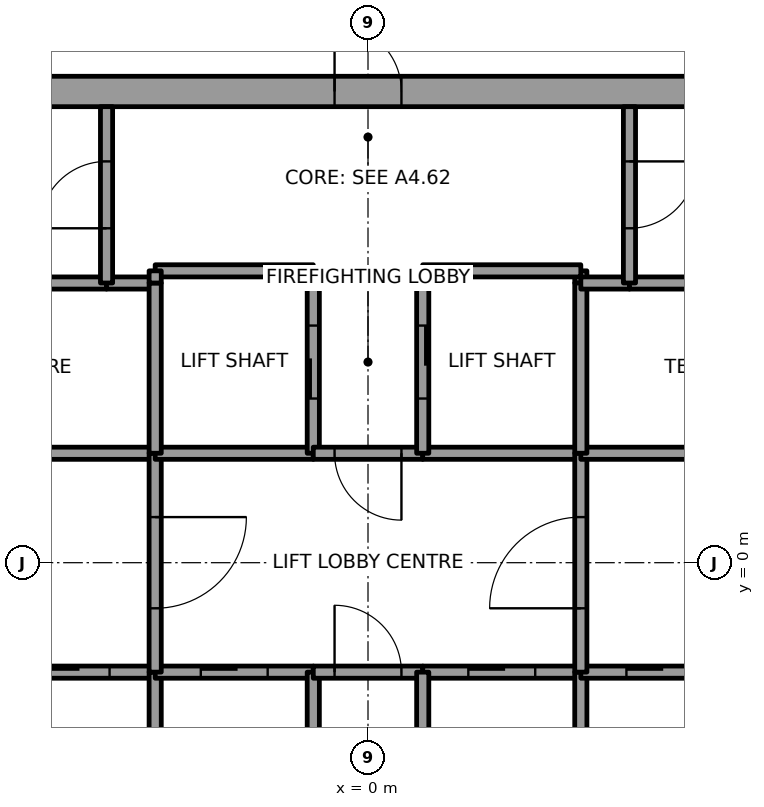
"""IFC4 building model, lengths in metres.
Left out: names, types, materials, properties, quantities, classifications, styles, units other than length and angle.
Written with IfcOpenShell. Run it as: python <this file> out.ifc"""

import sys

from ifc_helpers import new_model, si_unit, direction, frame, frame_2d, origin, place, context, subcontext, project, spatial, rectangle, extrude, element, fill, save


model = new_model("IFC4")
c1 = context("Model", 3, precision=1e-05, world=origin(), true_north=direction((0.0, 1.0)))
c2 = subcontext(c1, "Body", "Model", "MODEL_VIEW")
j1 = project(units=[si_unit("LENGTHUNIT", "METRE"), si_unit("PLANEANGLEUNIT", "RADIAN")], contexts=[c1])
p1 = place(None, origin())
s1 = spatial("IfcSite", under=j1, at=p1, CompositionType="ELEMENT")
p2 = place(p1, origin())
s2 = spatial("IfcBuilding", under=s1, at=p2, CompositionType="ELEMENT")
p3 = place(p2, frame((0.0, 0.0, 267.0)))
s3 = spatial("IfcBuildingStorey", under=s2, at=p3, CompositionType="ELEMENT", Elevation=267.0)
p4 = place(p3, frame((-11.0, 7.75, 0.0), z_axis=(0.0, 0.0, 1.0), x_axis=(1.0, 0.0, 0.0)))
e1 = element("IfcWall", 1, at=p4, inside=s3, PredefinedType="SHEAR", context=c2, shape_type="SweptSolid", body=[
    extrude(rectangle(XDim=22.0, YDim=0.5, at=frame_2d((11.0, 0.0))), origin(), (0.0, 0.0, 1.0), 4.0),
])
p5 = place(p4, frame((10.45, 0.0, 0.0)))
e2 = element("IfcOpeningElement", 2, at=p5, cuts=e1, PredefinedType="OPENING", context=c2, shape_type="SweptSolid", body=[
    extrude(rectangle(XDim=1.1, YDim=2.1, at=frame_2d((0.55, 1.05))), frame((0.0, 0.25, 0.0), z_axis=(0.0, -1.0, 0.0), x_axis=(1.0, 0.0, 0.0)), (0.0, 0.0, 1.0), 0.5),
])
p6 = place(p3, frame((-8.7, 1.8, 0.0), z_axis=(0.0, 0.0, 1.0), x_axis=(1.0, 0.0, 0.0)))
e3 = element("IfcWall", 3, at=p6, inside=s3, PredefinedType="SOLIDWALL", context=c2, shape_type="SweptSolid", body=[
    extrude(rectangle(XDim=5.2, YDim=0.2, at=frame_2d((2.6, 0.0))), origin(), (0.0, 0.0, 1.0), 3.85),
])
p7 = place(p6, frame((2.15, 0.0, 0.0)))
e4 = element("IfcOpeningElement", 4, at=p7, cuts=e3, PredefinedType="OPENING", context=c2, shape_type="SweptSolid", body=[
    extrude(rectangle(XDim=0.9, YDim=2.1, at=frame_2d((0.45, 1.05))), frame((0.0, 0.1, 0.0), z_axis=(0.0, -1.0, 0.0), x_axis=(1.0, 0.0, 0.0)), (0.0, 0.0, 1.0), 0.2),
])
p8 = place(p3, frame((-4.3, 4.6, 0.0), z_axis=(0.0, 0.0, 1.0), x_axis=(-1.0, 0.0, 0.0)))
e5 = element("IfcWall", 5, at=p8, inside=s3, PredefinedType="SOLIDWALL", context=c2, shape_type="SweptSolid", body=[
    extrude(rectangle(XDim=4.4, YDim=0.2, at=frame_2d((2.2, 0.0))), origin(), (0.0, 0.0, 1.0), 3.85),
])
p9 = place(p3, frame((-6.1, -1.8, 0.0), z_axis=(0.0, 0.0, 1.0), x_axis=(1.0, 0.0, 0.0)))
e6 = element("IfcWall", 6, at=p9, inside=s3, PredefinedType="SOLIDWALL", context=c2, shape_type="SweptSolid", body=[
    extrude(rectangle(XDim=2.6, YDim=0.2, at=frame_2d((1.3, 0.0))), origin(), (0.0, 0.0, 1.0), 3.85),
])
p10 = place(p9, frame((0.75, 0.0, 0.0)))
e7 = element("IfcOpeningElement", 7, at=p10, cuts=e6, PredefinedType="OPENING", context=c2, shape_type="SweptSolid", body=[
    extrude(rectangle(XDim=1.1, YDim=2.1, at=frame_2d((0.55, 1.05))), frame((0.0, 0.1, 0.0), z_axis=(0.0, -1.0, 0.0), x_axis=(1.0, 0.0, 0.0)), (0.0, 0.0, 1.0), 0.2),
])
p11 = place(p3, frame((-3.5, 4.6, 0.0), z_axis=(0.0, 0.0, 1.0), x_axis=(-1.0, 0.0, 0.0)))
e8 = element("IfcWall", 8, at=p11, inside=s3, PredefinedType="SOLIDWALL", context=c2, shape_type="SweptSolid", body=[
    extrude(rectangle(XDim=0.8, YDim=0.2, at=frame_2d((0.4, 0.0))), origin(), (0.0, 0.0, 1.0), 3.85),
])
p12 = place(p3, frame((-4.3, 4.6, 0.0), z_axis=(0.0, 0.0, 1.0), x_axis=(0.0, 1.0, 0.0)))
e9 = element("IfcWall", 9, at=p12, inside=s3, PredefinedType="SOLIDWALL", context=c2, shape_type="SweptSolid", body=[
    extrude(rectangle(XDim=2.9, YDim=0.2, at=frame_2d((1.45, 0.0))), origin(), (0.0, 0.0, 1.0), 3.85),
])
p13 = place(p12, frame((0.9, 0.0, 0.0)))
e10 = element("IfcOpeningElement", 10, at=p13, cuts=e9, PredefinedType="OPENING", context=c2, shape_type="SweptSolid", body=[
    extrude(rectangle(XDim=1.1, YDim=2.1, at=frame_2d((0.55, 1.05))), frame((0.0, 0.1, 0.0), z_axis=(0.0, -1.0, 0.0), x_axis=(1.0, 0.0, 0.0)), (0.0, 0.0, 1.0), 0.2),
])
p14 = place(p3, frame((-3.5, -4.6, 0.0), z_axis=(0.0, 0.0, 1.0), x_axis=(0.0, 1.0, 0.0)))
e11 = element("IfcWall", 11, at=p14, inside=s3, PredefinedType="SOLIDWALL", context=c2, shape_type="SweptSolid", body=[
    extrude(rectangle(XDim=2.8, YDim=0.2, at=frame_2d((1.4, 0.0))), origin(), (0.0, 0.0, 1.0), 3.85),
])
p15 = place(p3, frame((-3.5, -1.8, 0.0), z_axis=(0.0, 0.0, 1.0), x_axis=(1.0, 0.0, 0.0)))
e12 = element("IfcWall", 12, at=p15, inside=s3, PredefinedType="SOLIDWALL", context=c2, shape_type="SweptSolid", body=[
    extrude(rectangle(XDim=2.6, YDim=0.2, at=frame_2d((1.3, 0.0))), origin(), (0.0, 0.0, 1.0), 3.85),
])
p16 = place(p15, frame((0.75, 0.0, 0.0)))
e13 = element("IfcOpeningElement", 13, at=p16, cuts=e12, PredefinedType="OPENING", context=c2, shape_type="SweptSolid", body=[
    extrude(rectangle(XDim=1.1, YDim=2.1, at=frame_2d((0.55, 1.05))), frame((0.0, 0.1, 0.0), z_axis=(0.0, -1.0, 0.0), x_axis=(1.0, 0.0, 0.0)), (0.0, 0.0, 1.0), 0.2),
])
p17 = place(p3, frame((-3.5, 1.8, 0.0), z_axis=(0.0, 0.0, 1.0), x_axis=(0.0, -1.0, 0.0)))
e14 = element("IfcWall", 14, at=p17, inside=s3, PredefinedType="SOLIDWALL", context=c2, shape_type="SweptSolid", body=[
    extrude(rectangle(XDim=3.6, YDim=0.2, at=frame_2d((1.8, 0.0))), origin(), (0.0, 0.0, 1.0), 3.85),
])
p18 = place(p17, frame((1.05, 0.0, 0.0)))
e15 = element("IfcOpeningElement", 15, at=p18, cuts=e14, PredefinedType="OPENING", context=c2, shape_type="SweptSolid", body=[
    extrude(rectangle(XDim=1.5, YDim=2.1, at=frame_2d((0.75, 1.05))), frame((0.0, 0.1, 0.0), z_axis=(0.0, -1.0, 0.0), x_axis=(1.0, 0.0, 0.0)), (0.0, 0.0, 1.0), 0.2),
])
p19 = place(p3, frame((-0.9, 1.8, 0.0), z_axis=(0.0, 0.0, 1.0), x_axis=(-1.0, 0.0, 0.0)))
e16 = element("IfcWall", 16, at=p19, inside=s3, PredefinedType="SOLIDWALL", context=c2, shape_type="SweptSolid", body=[
    extrude(rectangle(XDim=2.6, YDim=0.2, at=frame_2d((1.3, 0.0))), origin(), (0.0, 0.0, 1.0), 3.85),
])
p20 = place(p3, frame((-3.5, 1.8, 0.0), z_axis=(0.0, 0.0, 1.0), x_axis=(0.0, 1.0, 0.0)))
e17 = element("IfcWall", 17, at=p20, inside=s3, PredefinedType="SOLIDWALL", context=c2, shape_type="SweptSolid", body=[
    extrude(rectangle(XDim=2.8, YDim=0.2, at=frame_2d((1.4, 0.0))), origin(), (0.0, 0.0, 1.0), 3.85),
])
p21 = place(p3, frame((-0.9, 1.8, 0.0), z_axis=(0.0, 0.0, 1.0), x_axis=(0.0, 1.0, 0.0)))
e18 = element("IfcWall", 18, at=p21, inside=s3, PredefinedType="SOLIDWALL", context=c2, shape_type="SweptSolid", body=[
    extrude(rectangle(XDim=3.0, YDim=0.2, at=frame_2d((1.5, 0.0))), origin(), (0.0, 0.0, 1.0), 3.85),
])
p22 = place(p21, frame((0.9, 0.0, 0.0)))
e19 = element("IfcOpeningElement", 19, at=p22, cuts=e18, PredefinedType="OPENING", context=c2, shape_type="SweptSolid", body=[
    extrude(rectangle(XDim=1.2, YDim=2.1, at=frame_2d((0.6, 1.05))), frame((0.0, 0.1, 0.0), z_axis=(0.0, -1.0, 0.0), x_axis=(1.0, 0.0, 0.0)), (0.0, 0.0, 1.0), 0.2),
])
p23 = place(p3, frame((-0.9, 4.8, 0.0), z_axis=(0.0, 0.0, 1.0), x_axis=(-1.0, 0.0, 0.0)))
e20 = element("IfcWall", 20, at=p23, inside=s3, PredefinedType="SOLIDWALL", context=c2, shape_type="SweptSolid", body=[
    extrude(rectangle(XDim=2.6, YDim=0.2, at=frame_2d((1.3, 0.0))), origin(), (0.0, 0.0, 1.0), 3.85),
])
p24 = place(p3, frame((-3.5, 4.8, 0.0), z_axis=(0.0, 0.0, 1.0), x_axis=(0.0, -1.0, 0.0)))
e21 = element("IfcWall", 21, at=p24, inside=s3, PredefinedType="SOLIDWALL", context=c2, shape_type="SweptSolid", body=[
    extrude(rectangle(XDim=0.2, YDim=0.2, at=frame_2d((0.1, 0.0))), origin(), (0.0, 0.0, 1.0), 3.85),
])
p25 = place(p3, frame((-0.9, -4.6, 0.0), z_axis=(0.0, 0.0, 1.0), x_axis=(0.0, 1.0, 0.0)))
e22 = element("IfcWall", 22, at=p25, inside=s3, PredefinedType="SOLIDWALL", context=c2, shape_type="SweptSolid", body=[
    extrude(rectangle(XDim=2.8, YDim=0.2, at=frame_2d((1.4, 0.0))), origin(), (0.0, 0.0, 1.0), 3.85),
])
p26 = place(p3, frame((-0.9, -1.8, 0.0), z_axis=(0.0, 0.0, 1.0), x_axis=(1.0, 0.0, 0.0)))
e23 = element("IfcWall", 23, at=p26, inside=s3, PredefinedType="SOLIDWALL", context=c2, shape_type="SweptSolid", body=[
    extrude(rectangle(XDim=1.8, YDim=0.2, at=frame_2d((0.9, 0.0))), origin(), (0.0, 0.0, 1.0), 3.85),
])
p27 = place(p26, frame((0.35, 0.0, 0.0)))
e24 = element("IfcOpeningElement", 24, at=p27, cuts=e23, PredefinedType="OPENING", context=c2, shape_type="SweptSolid", body=[
    extrude(rectangle(XDim=1.1, YDim=2.1, at=frame_2d((0.55, 1.05))), frame((0.0, 0.1, 0.0), z_axis=(0.0, -1.0, 0.0), x_axis=(1.0, 0.0, 0.0)), (0.0, 0.0, 1.0), 0.2),
])
p28 = place(p3, frame((0.9, 1.8, 0.0), z_axis=(0.0, 0.0, 1.0), x_axis=(-1.0, 0.0, 0.0)))
e25 = element("IfcWall", 25, at=p28, inside=s3, PredefinedType="SOLIDWALL", context=c2, shape_type="SweptSolid", body=[
    extrude(rectangle(XDim=1.8, YDim=0.2, at=frame_2d((0.9, 0.0))), origin(), (0.0, 0.0, 1.0), 3.85),
])
p29 = place(p28, frame((0.35, 0.0, 0.0)))
e26 = element("IfcOpeningElement", 26, at=p29, cuts=e25, PredefinedType="OPENING", context=c2, shape_type="SweptSolid", body=[
    extrude(rectangle(XDim=1.1, YDim=2.1, at=frame_2d((0.55, 1.05))), frame((0.0, 0.1, 0.0), z_axis=(0.0, -1.0, 0.0), x_axis=(1.0, 0.0, 0.0)), (0.0, 0.0, 1.0), 0.2),
])
p30 = place(p3, frame((0.9, -1.8, 0.0), z_axis=(0.0, 0.0, 1.0), x_axis=(1.0, 0.0, 0.0)))
e27 = element("IfcWall", 27, at=p30, inside=s3, PredefinedType="SOLIDWALL", context=c2, shape_type="SweptSolid", body=[
    extrude(rectangle(XDim=2.6, YDim=0.2, at=frame_2d((1.3, 0.0))), origin(), (0.0, 0.0, 1.0), 3.85),
])
p31 = place(p30, frame((0.75, 0.0, 0.0)))
e28 = element("IfcOpeningElement", 28, at=p31, cuts=e27, PredefinedType="OPENING", context=c2, shape_type="SweptSolid", body=[
    extrude(rectangle(XDim=1.1, YDim=2.1, at=frame_2d((0.55, 1.05))), frame((0.0, 0.1, 0.0), z_axis=(0.0, -1.0, 0.0), x_axis=(1.0, 0.0, 0.0)), (0.0, 0.0, 1.0), 0.2),
])
p32 = place(p3, frame((0.9, -1.8, 0.0), z_axis=(0.0, 0.0, 1.0), x_axis=(0.0, -1.0, 0.0)))
e29 = element("IfcWall", 29, at=p32, inside=s3, PredefinedType="SOLIDWALL", context=c2, shape_type="SweptSolid", body=[
    extrude(rectangle(XDim=2.8, YDim=0.2, at=frame_2d((1.4, 0.0))), origin(), (0.0, 0.0, 1.0), 3.85),
])
p33 = place(p3, frame((3.5, 1.8, 0.0), z_axis=(0.0, 0.0, 1.0), x_axis=(-1.0, 0.0, 0.0)))
e30 = element("IfcWall", 30, at=p33, inside=s3, PredefinedType="SOLIDWALL", context=c2, shape_type="SweptSolid", body=[
    extrude(rectangle(XDim=2.6, YDim=0.2, at=frame_2d((1.3, 0.0))), origin(), (0.0, 0.0, 1.0), 3.85),
])
p34 = place(p3, frame((3.5, 4.6, 0.0), z_axis=(0.0, 0.0, 1.0), x_axis=(0.0, 1.0, 0.0)))
e31 = element("IfcWall", 31, at=p34, inside=s3, PredefinedType="SOLIDWALL", context=c2, shape_type="SweptSolid", body=[
    extrude(rectangle(XDim=0.2, YDim=0.2, at=frame_2d((0.1, 0.0))), origin(), (0.0, 0.0, 1.0), 3.85),
])
p35 = place(p3, frame((3.5, 4.8, 0.0), z_axis=(0.0, 0.0, 1.0), x_axis=(-1.0, 0.0, 0.0)))
e32 = element("IfcWall", 32, at=p35, inside=s3, PredefinedType="SOLIDWALL", context=c2, shape_type="SweptSolid", body=[
    extrude(rectangle(XDim=2.6, YDim=0.2, at=frame_2d((1.3, 0.0))), origin(), (0.0, 0.0, 1.0), 3.85),
])
p36 = place(p3, frame((0.9, 4.8, 0.0), z_axis=(0.0, 0.0, 1.0), x_axis=(0.0, -1.0, 0.0)))
e33 = element("IfcWall", 33, at=p36, inside=s3, PredefinedType="SOLIDWALL", context=c2, shape_type="SweptSolid", body=[
    extrude(rectangle(XDim=3.0, YDim=0.2, at=frame_2d((1.5, 0.0))), origin(), (0.0, 0.0, 1.0), 3.85),
])
p37 = place(p36, frame((0.9, 0.0, 0.0)))
e34 = element("IfcOpeningElement", 34, at=p37, cuts=e33, PredefinedType="OPENING", context=c2, shape_type="SweptSolid", body=[
    extrude(rectangle(XDim=1.2, YDim=2.1, at=frame_2d((0.6, 1.05))), frame((0.0, 0.1, 0.0), z_axis=(0.0, -1.0, 0.0), x_axis=(1.0, 0.0, 0.0)), (0.0, 0.0, 1.0), 0.2),
])
p38 = place(p3, frame((3.5, -4.6, 0.0), z_axis=(0.0, 0.0, 1.0), x_axis=(0.0, 1.0, 0.0)))
e35 = element("IfcWall", 35, at=p38, inside=s3, PredefinedType="SOLIDWALL", context=c2, shape_type="SweptSolid", body=[
    extrude(rectangle(XDim=2.8, YDim=0.2, at=frame_2d((1.4, 0.0))), origin(), (0.0, 0.0, 1.0), 3.85),
])
p39 = place(p3, frame((3.5, -1.8, 0.0), z_axis=(0.0, 0.0, 1.0), x_axis=(1.0, 0.0, 0.0)))
e36 = element("IfcWall", 36, at=p39, inside=s3, PredefinedType="SOLIDWALL", context=c2, shape_type="SweptSolid", body=[
    extrude(rectangle(XDim=2.6, YDim=0.2, at=frame_2d((1.3, 0.0))), origin(), (0.0, 0.0, 1.0), 3.85),
])
p40 = place(p39, frame((0.75, 0.0, 0.0)))
e37 = element("IfcOpeningElement", 37, at=p40, cuts=e36, PredefinedType="OPENING", context=c2, shape_type="SweptSolid", body=[
    extrude(rectangle(XDim=1.1, YDim=2.1, at=frame_2d((0.55, 1.05))), frame((0.0, 0.1, 0.0), z_axis=(0.0, -1.0, 0.0), x_axis=(1.0, 0.0, 0.0)), (0.0, 0.0, 1.0), 0.2),
])
p41 = place(p3, frame((3.5, -1.8, 0.0), z_axis=(0.0, 0.0, 1.0), x_axis=(0.0, 1.0, 0.0)))
e38 = element("IfcWall", 38, at=p41, inside=s3, PredefinedType="SOLIDWALL", context=c2, shape_type="SweptSolid", body=[
    extrude(rectangle(XDim=3.6, YDim=0.2, at=frame_2d((1.8, 0.0))), origin(), (0.0, 0.0, 1.0), 3.85),
])
p42 = place(p41, frame((1.05, 0.0, 0.0)))
e39 = element("IfcOpeningElement", 39, at=p42, cuts=e38, PredefinedType="OPENING", context=c2, shape_type="SweptSolid", body=[
    extrude(rectangle(XDim=1.5, YDim=2.1, at=frame_2d((0.75, 1.05))), frame((0.0, 0.1, 0.0), z_axis=(0.0, -1.0, 0.0), x_axis=(1.0, 0.0, 0.0)), (0.0, 0.0, 1.0), 0.2),
])
p43 = place(p3, frame((3.5, 1.8, 0.0), z_axis=(0.0, 0.0, 1.0), x_axis=(1.0, 0.0, 0.0)))
e40 = element("IfcWall", 40, at=p43, inside=s3, PredefinedType="SOLIDWALL", context=c2, shape_type="SweptSolid", body=[
    extrude(rectangle(XDim=5.2, YDim=0.2, at=frame_2d((2.6, 0.0))), origin(), (0.0, 0.0, 1.0), 3.85),
])
p44 = place(p43, frame((2.15, 0.0, 0.0)))
e41 = element("IfcOpeningElement", 41, at=p44, cuts=e40, PredefinedType="OPENING", context=c2, shape_type="SweptSolid", body=[
    extrude(rectangle(XDim=0.9, YDim=2.1, at=frame_2d((0.45, 1.05))), frame((0.0, 0.1, 0.0), z_axis=(0.0, -1.0, 0.0), x_axis=(1.0, 0.0, 0.0)), (0.0, 0.0, 1.0), 0.2),
])
p45 = place(p3, frame((3.5, 4.6, 0.0), z_axis=(0.0, 0.0, 1.0), x_axis=(0.0, -1.0, 0.0)))
e42 = element("IfcWall", 42, at=p45, inside=s3, PredefinedType="SOLIDWALL", context=c2, shape_type="SweptSolid", body=[
    extrude(rectangle(XDim=2.8, YDim=0.2, at=frame_2d((1.4, 0.0))), origin(), (0.0, 0.0, 1.0), 3.85),
])
p46 = place(p3, frame((4.3, 4.6, 0.0), z_axis=(0.0, 0.0, 1.0), x_axis=(-1.0, 0.0, 0.0)))
e43 = element("IfcWall", 43, at=p46, inside=s3, PredefinedType="SOLIDWALL", context=c2, shape_type="SweptSolid", body=[
    extrude(rectangle(XDim=0.8, YDim=0.2, at=frame_2d((0.4, 0.0))), origin(), (0.0, 0.0, 1.0), 3.85),
])
p47 = place(p3, frame((8.7, 4.6, 0.0), z_axis=(0.0, 0.0, 1.0), x_axis=(-1.0, 0.0, 0.0)))
e44 = element("IfcWall", 44, at=p47, inside=s3, PredefinedType="SOLIDWALL", context=c2, shape_type="SweptSolid", body=[
    extrude(rectangle(XDim=4.4, YDim=0.2, at=frame_2d((2.2, 0.0))), origin(), (0.0, 0.0, 1.0), 3.85),
])
p48 = place(p3, frame((4.3, 7.5, 0.0), z_axis=(0.0, 0.0, 1.0), x_axis=(0.0, -1.0, 0.0)))
e45 = element("IfcWall", 45, at=p48, inside=s3, PredefinedType="SOLIDWALL", context=c2, shape_type="SweptSolid", body=[
    extrude(rectangle(XDim=2.9, YDim=0.2, at=frame_2d((1.45, 0.0))), origin(), (0.0, 0.0, 1.0), 3.85),
])
p49 = place(p48, frame((0.9, 0.0, 0.0)))
e46 = element("IfcOpeningElement", 46, at=p49, cuts=e45, PredefinedType="OPENING", context=c2, shape_type="SweptSolid", body=[
    extrude(rectangle(XDim=1.1, YDim=2.1, at=frame_2d((0.55, 1.05))), frame((0.0, 0.1, 0.0), z_axis=(0.0, -1.0, 0.0), x_axis=(1.0, 0.0, 0.0)), (0.0, 0.0, 1.0), 0.2),
])
p50 = place(p10, origin())
e47 = element("IfcDoor", 47, at=p50, inside=s3, OperationType="SLIDING_TO_LEFT", PredefinedType="DOOR", context=c2, shape_type="SweptSolid", body=[
    extrude(rectangle(XDim=1.1, YDim=2.1, at=frame_2d((0.55, 1.05))), frame((0.0, 0.025, 0.0), z_axis=(0.0, -1.0, 0.0), x_axis=(1.0, 0.0, 0.0)), (0.0, 0.0, 1.0), 0.05),
])
fill(e7, e47)
p51 = place(p16, origin())
e48 = element("IfcDoor", 48, at=p51, inside=s3, OperationType="SLIDING_TO_LEFT", PredefinedType="DOOR", context=c2, shape_type="SweptSolid", body=[
    extrude(rectangle(XDim=1.1, YDim=2.1, at=frame_2d((0.55, 1.05))), frame((0.0, 0.025, 0.0), z_axis=(0.0, -1.0, 0.0), x_axis=(1.0, 0.0, 0.0)), (0.0, 0.0, 1.0), 0.05),
])
fill(e13, e48)
p52 = place(p31, origin())
e49 = element("IfcDoor", 49, at=p52, inside=s3, OperationType="SLIDING_TO_RIGHT", PredefinedType="DOOR", context=c2, shape_type="SweptSolid", body=[
    extrude(rectangle(XDim=1.1, YDim=2.1, at=frame_2d((0.55, 1.05))), frame((0.0, 0.025, 0.0), z_axis=(0.0, -1.0, 0.0), x_axis=(1.0, 0.0, 0.0)), (0.0, 0.0, 1.0), 0.05),
])
fill(e28, e49)
p53 = place(p40, origin())
e50 = element("IfcDoor", 50, at=p53, inside=s3, OperationType="SLIDING_TO_LEFT", PredefinedType="DOOR", context=c2, shape_type="SweptSolid", body=[
    extrude(rectangle(XDim=1.1, YDim=2.1, at=frame_2d((0.55, 1.05))), frame((0.0, 0.025, 0.0), z_axis=(0.0, -1.0, 0.0), x_axis=(1.0, 0.0, 0.0)), (0.0, 0.0, 1.0), 0.05),
])
fill(e37, e50)
p54 = place(p22, origin())
e51 = element("IfcDoor", 51, at=p54, inside=s3, OperationType="SLIDING_TO_RIGHT", PredefinedType="DOOR", context=c2, shape_type="SweptSolid", body=[
    extrude(rectangle(XDim=1.2, YDim=2.1, at=frame_2d((0.6, 1.05))), frame((0.0, 0.025, 0.0), z_axis=(0.0, -1.0, 0.0), x_axis=(1.0, 0.0, 0.0)), (0.0, 0.0, 1.0), 0.05),
])
fill(e19, e51)
p55 = place(p37, origin())
e52 = element("IfcDoor", 52, at=p55, inside=s3, OperationType="SLIDING_TO_LEFT", PredefinedType="DOOR", context=c2, shape_type="SweptSolid", body=[
    extrude(rectangle(XDim=1.2, YDim=2.1, at=frame_2d((0.6, 1.05))), frame((0.0, 0.025, 0.0), z_axis=(0.0, -1.0, 0.0), x_axis=(1.0, 0.0, 0.0)), (0.0, 0.0, 1.0), 0.05),
])
fill(e34, e52)
p56 = place(p18, origin())
e53 = element("IfcDoor", 53, at=p56, inside=s3, OperationType="DOUBLE_DOOR_SINGLE_SWING", PredefinedType="DOOR", context=c2, shape_type="SweptSolid", body=[
    extrude(rectangle(XDim=1.5, YDim=2.1, at=frame_2d((0.75, 1.05))), frame((0.0, 0.025, 0.0), z_axis=(0.0, -1.0, 0.0), x_axis=(1.0, 0.0, 0.0)), (0.0, 0.0, 1.0), 0.05),
])
fill(e15, e53)
p57 = place(p42, origin())
e54 = element("IfcDoor", 54, at=p57, inside=s3, OperationType="DOUBLE_DOOR_SINGLE_SWING", PredefinedType="DOOR", context=c2, shape_type="SweptSolid", body=[
    extrude(rectangle(XDim=1.5, YDim=2.1, at=frame_2d((0.75, 1.05))), frame((0.0, 0.025, 0.0), z_axis=(0.0, -1.0, 0.0), x_axis=(1.0, 0.0, 0.0)), (0.0, 0.0, 1.0), 0.05),
])
fill(e39, e54)
p58 = place(p29, origin())
e55 = element("IfcDoor", 55, at=p58, inside=s3, OperationType="SINGLE_SWING_LEFT", PredefinedType="DOOR", context=c2, shape_type="SweptSolid", body=[
    extrude(rectangle(XDim=1.1, YDim=2.1, at=frame_2d((0.55, 1.05))), frame((0.0, 0.025, 0.0), z_axis=(0.0, -1.0, 0.0), x_axis=(1.0, 0.0, 0.0)), (0.0, 0.0, 1.0), 0.05),
])
fill(e26, e55)
p59 = place(p27, origin())
e56 = element("IfcDoor", 56, at=p59, inside=s3, OperationType="SINGLE_SWING_LEFT", PredefinedType="DOOR", context=c2, shape_type="SweptSolid", body=[
    extrude(rectangle(XDim=1.1, YDim=2.1, at=frame_2d((0.55, 1.05))), frame((0.0, 0.025, 0.0), z_axis=(0.0, -1.0, 0.0), x_axis=(1.0, 0.0, 0.0)), (0.0, 0.0, 1.0), 0.05),
])
fill(e24, e56)
p60 = place(p13, origin())
e57 = element("IfcDoor", 57, at=p60, inside=s3, OperationType="SINGLE_SWING_RIGHT", PredefinedType="DOOR", context=c2, shape_type="SweptSolid", body=[
    extrude(rectangle(XDim=1.1, YDim=2.1, at=frame_2d((0.55, 1.05))), frame((0.0, 0.025, 0.0), z_axis=(0.0, -1.0, 0.0), x_axis=(1.0, 0.0, 0.0)), (0.0, 0.0, 1.0), 0.05),
])
fill(e10, e57)
p61 = place(p49, origin())
e58 = element("IfcDoor", 58, at=p61, inside=s3, OperationType="SINGLE_SWING_RIGHT", PredefinedType="DOOR", context=c2, shape_type="SweptSolid", body=[
    extrude(rectangle(XDim=1.1, YDim=2.1, at=frame_2d((0.55, 1.05))), frame((0.0, 0.025, 0.0), z_axis=(0.0, -1.0, 0.0), x_axis=(1.0, 0.0, 0.0)), (0.0, 0.0, 1.0), 0.05),
])
fill(e46, e58)
p62 = place(p5, origin())
e59 = element("IfcDoor", 59, at=p62, inside=s3, OperationType="SINGLE_SWING_LEFT", PredefinedType="DOOR", context=c2, shape_type="SweptSolid", body=[
    extrude(rectangle(XDim=1.1, YDim=2.1, at=frame_2d((0.55, 1.05))), frame((0.0, 0.025, 0.0), z_axis=(0.0, -1.0, 0.0), x_axis=(1.0, 0.0, 0.0)), (0.0, 0.0, 1.0), 0.05),
])
fill(e2, e59)
save(model, sys.argv[1])
